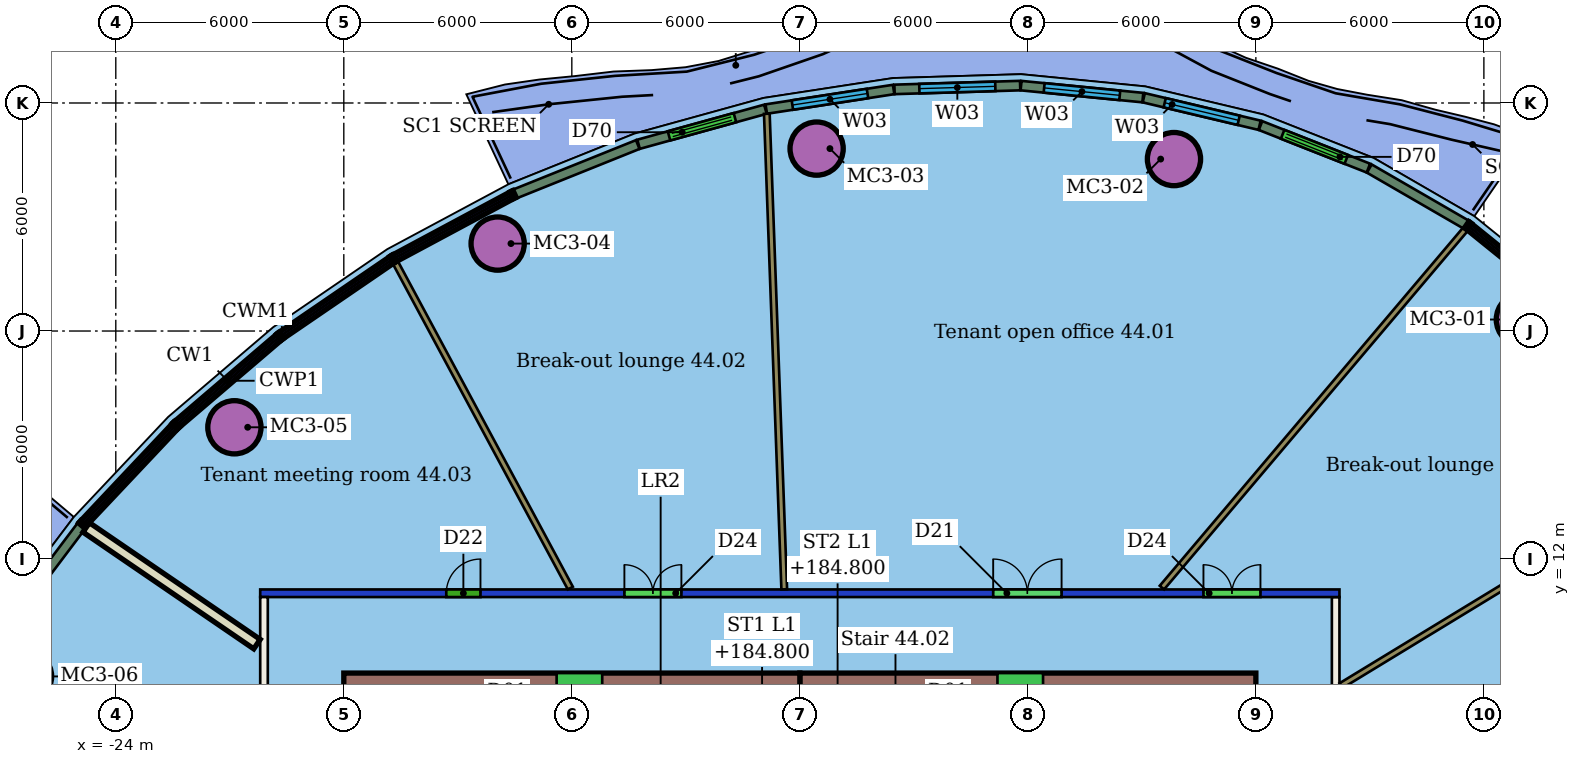
"""IFC4 building model, lengths in metres.
Left out: names, types, materials, properties, quantities, classifications, styles, units other than length and angle.
Written with IfcOpenShell. Run it as: python <this file> out.ifc"""

import sys

from ifc_helpers import new_model, si_unit, direction, frame, frame_2d, origin, origin_2d, place, context, subcontext, project, spatial, rectangle, hollow_circle, extrude, element, fill, save


model = new_model("IFC4")
c1 = context("Model", 3, precision=1e-05, world=origin(), true_north=direction((0.0, 1.0)))
c2 = subcontext(c1, "Body", "Model", "MODEL_VIEW")
j1 = project(units=[si_unit("LENGTHUNIT", "METRE"), si_unit("PLANEANGLEUNIT", "RADIAN")], contexts=[c1])
p1 = place(None, origin())
s1 = spatial("IfcSite", under=j1, at=p1, CompositionType="ELEMENT")
p2 = place(p1, origin())
s2 = spatial("IfcBuilding", under=s1, at=p2, CompositionType="ELEMENT")
p3 = place(p2, frame((0.0, 0.0, 183.0)))
s3 = spatial("IfcBuildingStorey", under=s2, at=p3, CompositionType="ELEMENT", Elevation=183.0)
for number, where, z_axis, x_axis in (
    (1, (13.026, 18.303, 0.0), (0.0, 0.0, 1.0), (1.0, 0.0, 0.0)),
    (2, (3.845, 22.524, 0.0), (0.0, 0.0, 1.0), (1.0, 0.0, 0.0)),
    (3, (-5.558, 22.8, 0.0), (0.0, 0.0, 1.0), (1.0, 0.0, 0.0)),
    (4, (-13.952, 20.301, 0.0), (0.0, 0.0, 1.0), (1.0, 0.0, 0.0)),
    (5, (-20.879, 15.467, 0.0), (0.0, 0.0, 1.0), (1.0, 0.0, 0.0)),
):
    element("IfcColumn", number, at=place(p3, frame(where, z_axis=z_axis, x_axis=x_axis)), inside=s3, PredefinedType="COLUMN", context=c2, shape_type="SweptSolid", body=[
        extrude(hollow_circle(Radius=0.7, WallThickness=0.05, at=origin_2d()), origin(), (0.0, 0.0, 1.0), 3.45),
    ])
p4 = place(p3, frame((-20.1, -11.0, 0.0), z_axis=(0.0, 0.0, 1.0), x_axis=(0.0, 1.0, 0.0)))
e6 = element("IfcWall", 6, at=p4, inside=s3, PredefinedType="PARTITIONING", context=c2, shape_type="SweptSolid", body=[
    extrude(rectangle(XDim=22.0, YDim=0.2, at=frame_2d((11.0, 0.0))), origin(), (0.0, 0.0, 1.0), 3.45),
])
p5 = place(p4, frame((15.37, 0.0, 0.0)))
e7 = element("IfcOpeningElement", 7, at=p5, cuts=e6, PredefinedType="OPENING", context=c2, shape_type="SweptSolid", body=[
    extrude(rectangle(XDim=1.2, YDim=2.1, at=frame_2d((0.6, 1.05))), frame((0.0, 0.11, 0.0), z_axis=(0.0, -1.0, 0.0), x_axis=(1.0, 0.0, 0.0)), (0.0, 0.0, 1.0), 0.22),
])
p6 = place(p4, frame((9.37, 0.0, 0.0)))
e8 = element("IfcOpeningElement", 8, at=p6, cuts=e6, PredefinedType="OPENING", context=c2, shape_type="SweptSolid", body=[
    extrude(rectangle(XDim=1.2, YDim=2.1, at=frame_2d((0.6, 1.05))), frame((0.0, 0.11, 0.0), z_axis=(0.0, -1.0, 0.0), x_axis=(1.0, 0.0, 0.0)), (0.0, 0.0, 1.0), 0.22),
])
p7 = place(p4, frame((5.797, 0.0, 0.0)))
e9 = element("IfcOpeningElement", 9, at=p7, cuts=e6, PredefinedType="OPENING", context=c2, shape_type="SweptSolid", body=[
    extrude(rectangle(XDim=1.2, YDim=2.1, at=frame_2d((0.6, 1.05))), frame((0.0, 0.11, 0.0), z_axis=(0.0, -1.0, 0.0), x_axis=(1.0, 0.0, 0.0)), (0.0, 0.0, 1.0), 0.22),
])
p8 = place(p3, frame((-20.2, 11.1, 0.0), z_axis=(0.0, 0.0, 1.0), x_axis=(1.0, 0.0, 0.0)))
e10 = element("IfcWall", 10, at=p8, inside=s3, PredefinedType="PARTITIONING", context=c2, shape_type="SweptSolid", body=[
    extrude(rectangle(XDim=28.4, YDim=0.2, at=frame_2d((14.2, 0.0))), origin(), (0.0, 0.0, 1.0), 3.05),
])
p9 = place(p8, frame((19.288, 0.0, 0.0)))
e11 = element("IfcOpeningElement", 11, at=p9, cuts=e10, PredefinedType="OPENING", context=c2, shape_type="SweptSolid", body=[
    extrude(rectangle(XDim=1.8, YDim=2.1, at=frame_2d((0.9, 1.05))), frame((0.0, 0.11, 0.0), z_axis=(0.0, -1.0, 0.0), x_axis=(1.0, 0.0, 0.0)), (0.0, 0.0, 1.0), 0.22),
])
p10 = place(p8, frame((9.583, 0.0, 0.0)))
e12 = element("IfcOpeningElement", 12, at=p10, cuts=e10, PredefinedType="OPENING", context=c2, shape_type="SweptSolid", body=[
    extrude(rectangle(XDim=1.5, YDim=2.1, at=frame_2d((0.75, 1.05))), frame((0.0, 0.11, 0.0), z_axis=(0.0, -1.0, 0.0), x_axis=(1.0, 0.0, 0.0)), (0.0, 0.0, 1.0), 0.22),
])
p11 = place(p8, frame((4.896, 0.0, 0.0)))
e13 = element("IfcOpeningElement", 13, at=p11, cuts=e10, PredefinedType="OPENING", context=c2, shape_type="SweptSolid", body=[
    extrude(rectangle(XDim=0.9, YDim=2.1, at=frame_2d((0.45, 1.05))), frame((0.0, 0.11, 0.0), z_axis=(0.0, -1.0, 0.0), x_axis=(1.0, 0.0, 0.0)), (0.0, 0.0, 1.0), 0.22),
])
p12 = place(p8, frame((24.821, 0.0, 0.0)))
e14 = element("IfcOpeningElement", 14, at=p12, cuts=e10, PredefinedType="OPENING", context=c2, shape_type="SweptSolid", body=[
    extrude(rectangle(XDim=1.5, YDim=2.1, at=frame_2d((0.75, 1.05))), frame((0.0, 0.11, 0.0), z_axis=(0.0, -1.0, 0.0), x_axis=(1.0, 0.0, 0.0)), (0.0, 0.0, 1.0), 0.22),
])
p13 = place(p3, frame((8.1, 11.0, 0.0), z_axis=(0.0, 0.0, 1.0), x_axis=(0.0, -1.0, 0.0)))
e15 = element("IfcWall", 15, at=p13, inside=s3, PredefinedType="PARTITIONING", context=c2, shape_type="SweptSolid", body=[
    extrude(rectangle(XDim=22.0, YDim=0.2, at=frame_2d((11.0, 0.0))), origin(), (0.0, 0.0, 1.0), 3.45),
])
p14 = place(p13, frame((11.367, 0.0, 0.0)))
e16 = element("IfcOpeningElement", 16, at=p14, cuts=e15, PredefinedType="OPENING", context=c2, shape_type="SweptSolid", body=[
    extrude(rectangle(XDim=1.8, YDim=2.1, at=frame_2d((0.9, 1.05))), frame((0.0, 0.11, 0.0), z_axis=(0.0, -1.0, 0.0), x_axis=(1.0, 0.0, 0.0)), (0.0, 0.0, 1.0), 0.22),
])
p15 = place(p13, frame((5.373, 0.0, 0.0)))
e17 = element("IfcOpeningElement", 17, at=p15, cuts=e15, PredefinedType="OPENING", context=c2, shape_type="SweptSolid", body=[
    extrude(rectangle(XDim=1.0, YDim=2.1, at=frame_2d((0.5, 1.05))), frame((0.0, 0.11, 0.0), z_axis=(0.0, -1.0, 0.0), x_axis=(1.0, 0.0, 0.0)), (0.0, 0.0, 1.0), 0.22),
])
p16 = place(p3, frame((11.509, 20.671, 0.0), z_axis=(0.0, 0.0, 1.0), x_axis=(-0.646338339336, -0.763050949219, 0.0)))
e18 = element("IfcWall", 18, at=p16, inside=s3, PredefinedType="PARTITIONING", context=c2, shape_type="SweptSolid", body=[
    extrude(rectangle(XDim=12.348, YDim=0.15, at=frame_2d((6.174, 0.0))), origin(), (0.0, 0.0, 1.0), 3.45),
])
p17 = place(p3, frame((-6.869, 23.716, 0.0), z_axis=(0.0, 0.0, 1.0), x_axis=(0.036615044028, -0.999329444453, 0.0)))
e19 = element("IfcWall", 19, at=p17, inside=s3, PredefinedType="PARTITIONING", context=c2, shape_type="SweptSolid", body=[
    extrude(rectangle(XDim=12.522, YDim=0.15, at=frame_2d((6.261, 0.0))), origin(), (0.0, 0.0, 1.0), 3.45),
])
p18 = place(p3, frame((-16.636, 19.79, 0.0), z_axis=(0.0, 0.0, 1.0), x_axis=(0.473414588536, -0.880839728532, 0.0)))
e20 = element("IfcWall", 20, at=p18, inside=s3, PredefinedType="PARTITIONING", context=c2, shape_type="SweptSolid", body=[
    extrude(rectangle(XDim=9.712, YDim=0.15, at=frame_2d((4.856, 0.0))), origin(), (0.0, 0.0, 1.0), 3.45),
])
p19 = place(p3, frame((-24.779, 12.832, 0.0), z_axis=(0.0, 0.0, 1.0), x_axis=(0.825654739336, -0.564175727422, 0.0)))
e21 = element("IfcWall", 21, at=p19, inside=s3, PredefinedType="PARTITIONING", context=c2, shape_type="SweptSolid", body=[
    extrude(rectangle(XDim=5.443, YDim=0.3, at=frame_2d((2.722, 0.0))), origin(), (0.0, 0.0, 1.0), 3.45),
])
p20 = place(p3, frame((17.335, 14.204, 0.0), z_axis=(0.0, 0.0, 1.0), x_axis=(-0.854194128167, -0.51995422049, 0.0)))
e22 = element("IfcWall", 22, at=p20, inside=s3, PredefinedType="PARTITIONING", context=c2, shape_type="SweptSolid", body=[
    extrude(rectangle(XDim=10.648, YDim=0.15, at=frame_2d((5.324, 0.0))), origin(), (0.0, 0.0, 1.0), 3.45),
])
p21 = place(p3, frame((11.532, 20.801, 0.0), z_axis=(0.0, 0.0, 1.0), x_axis=(-0.865519049877, 0.500876006912, 0.0)))
e23 = element("IfcWall", 23, at=p21, inside=s3, PredefinedType="SOLIDWALL", context=c2, shape_type="SweptSolid", body=[
    extrude(rectangle(XDim=2.943, YDim=0.25, at=frame_2d((1.471, 0.0))), origin(), (0.0, 0.0, 1.0), 3.1),
])
p22 = place(p3, frame((8.961, 22.287, 0.0), z_axis=(0.0, 0.0, 1.0), x_axis=(-0.930291773294, 0.366820414564, 0.0)))
e24 = element("IfcWall", 24, at=p22, inside=s3, PredefinedType="SOLIDWALL", context=c2, shape_type="SweptSolid", body=[
    extrude(rectangle(XDim=3.052, YDim=0.25, at=frame_2d((1.526, 0.0))), origin(), (0.0, 0.0, 1.0), 3.1),
])
p23 = place(p22, frame((0.626, 0.0, 0.0)))
e25 = element("IfcOpeningElement", 25, at=p23, cuts=e24, PredefinedType="OPENING", context=c2, shape_type="SweptSolid", body=[
    extrude(rectangle(XDim=1.8, YDim=2.4, at=frame_2d((0.9, 1.2))), frame((0.0, 0.135, 0.0), z_axis=(0.0, -1.0, 0.0), x_axis=(1.0, 0.0, 0.0)), (0.0, 0.0, 1.0), 0.27),
])
p24 = place(p3, frame((6.098, 23.414, 0.0), z_axis=(0.0, 0.0, 1.0), x_axis=(-0.972913986276, 0.231167418353, 0.0)))
e26 = element("IfcWall", 26, at=p24, inside=s3, PredefinedType="SOLIDWALL", context=c2, shape_type="SweptSolid", body=[
    extrude(rectangle(XDim=3.133, YDim=0.25, at=frame_2d((1.566, 0.0))), origin(), (0.0, 0.0, 1.0), 3.1),
])
p25 = place(p24, frame((0.566, 0.0, 0.9)))
e27 = element("IfcOpeningElement", 27, at=p25, cuts=e26, PredefinedType="OPENING", context=c2, shape_type="SweptSolid", body=[
    extrude(rectangle(XDim=2.0, YDim=2.1, at=frame_2d((1.0, 1.05))), frame((0.0, 0.135, 0.0), z_axis=(0.0, -1.0, 0.0), x_axis=(1.0, 0.0, 0.0)), (0.0, 0.0, 1.0), 0.27),
])
p26 = place(p3, frame((3.026, 24.142, 0.0), z_axis=(0.0, 0.0, 1.0), x_axis=(-0.995197289781, 0.097889501037, 0.0)))
e28 = element("IfcWall", 28, at=p26, inside=s3, PredefinedType="SOLIDWALL", context=c2, shape_type="SweptSolid", body=[
    extrude(rectangle(XDim=3.22, YDim=0.25, at=frame_2d((1.61, 0.0))), origin(), (0.0, 0.0, 1.0), 3.1),
])
p27 = place(p26, frame((0.61, 0.0, 0.9)))
e29 = element("IfcOpeningElement", 29, at=p27, cuts=e28, PredefinedType="OPENING", context=c2, shape_type="SweptSolid", body=[
    extrude(rectangle(XDim=2.0, YDim=2.1, at=frame_2d((1.0, 1.05))), frame((0.0, 0.135, 0.0), z_axis=(0.0, -1.0, 0.0), x_axis=(1.0, 0.0, 0.0)), (0.0, 0.0, 1.0), 0.27),
])
p28 = place(p3, frame((-0.203, 24.458, 0.0), z_axis=(0.0, 0.0, 1.0), x_axis=(-0.999539823928, -0.030333815819, 0.0)))
e30 = element("IfcWall", 30, at=p28, inside=s3, PredefinedType="SOLIDWALL", context=c2, shape_type="SweptSolid", body=[
    extrude(rectangle(XDim=3.308, YDim=0.25, at=frame_2d((1.654, 0.0))), origin(), (0.0, 0.0, 1.0), 3.1),
])
p29 = place(p28, frame((0.654, 0.0, 0.9)))
e31 = element("IfcOpeningElement", 31, at=p29, cuts=e30, PredefinedType="OPENING", context=c2, shape_type="SweptSolid", body=[
    extrude(rectangle(XDim=2.0, YDim=2.1, at=frame_2d((1.0, 1.05))), frame((0.0, 0.135, 0.0), z_axis=(0.0, -1.0, 0.0), x_axis=(1.0, 0.0, 0.0)), (0.0, 0.0, 1.0), 0.27),
])
p30 = place(p3, frame((-3.532, 24.355, 0.0), z_axis=(0.0, 0.0, 1.0), x_axis=(-0.988391666962, -0.151927326968, 0.0)))
e32 = element("IfcWall", 32, at=p30, inside=s3, PredefinedType="SOLIDWALL", context=c2, shape_type="SweptSolid", body=[
    extrude(rectangle(XDim=3.391, YDim=0.25, at=frame_2d((1.695, 0.0))), origin(), (0.0, 0.0, 1.0), 3.1),
])
p31 = place(p30, frame((0.695, 0.0, 0.9)))
e33 = element("IfcOpeningElement", 33, at=p31, cuts=e32, PredefinedType="OPENING", context=c2, shape_type="SweptSolid", body=[
    extrude(rectangle(XDim=2.0, YDim=2.1, at=frame_2d((1.0, 1.05))), frame((0.0, 0.135, 0.0), z_axis=(0.0, -1.0, 0.0), x_axis=(1.0, 0.0, 0.0)), (0.0, 0.0, 1.0), 0.27),
])
p32 = place(p3, frame((-6.906, 23.836, 0.0), z_axis=(0.0, 0.0, 1.0), x_axis=(-0.963922792933, -0.266181985236, 0.0)))
e34 = element("IfcWall", 34, at=p32, inside=s3, PredefinedType="SOLIDWALL", context=c2, shape_type="SweptSolid", body=[
    extrude(rectangle(XDim=3.463, YDim=0.25, at=frame_2d((1.732, 0.0))), origin(), (0.0, 0.0, 1.0), 3.1),
])
p33 = place(p32, frame((0.832, 0.0, 0.0)))
e35 = element("IfcOpeningElement", 35, at=p33, cuts=e34, PredefinedType="OPENING", context=c2, shape_type="SweptSolid", body=[
    extrude(rectangle(XDim=1.8, YDim=2.4, at=frame_2d((0.9, 1.2))), frame((0.0, 0.135, 0.0), z_axis=(0.0, -1.0, 0.0), x_axis=(1.0, 0.0, 0.0)), (0.0, 0.0, 1.0), 0.27),
])
p34 = place(p3, frame((-10.265, 22.907, 0.0), z_axis=(0.0, 0.0, 1.0), x_axis=(-0.92785563981, -0.372939554984, 0.0)))
e36 = element("IfcWall", 36, at=p34, inside=s3, PredefinedType="SOLIDWALL", context=c2, shape_type="SweptSolid", body=[
    extrude(rectangle(XDim=3.478, YDim=0.25, at=frame_2d((1.739, 0.0))), origin(), (0.0, 0.0, 1.0), 3.1),
])
p35 = place(p3, frame((-24.908, 12.869, 0.0), z_axis=(0.0, 0.0, 1.0), x_axis=(-0.602031278038, -0.798472504388, 0.0)))
e37 = element("IfcWall", 37, at=p35, inside=s3, PredefinedType="SOLIDWALL", context=c2, shape_type="SweptSolid", body=[
    extrude(rectangle(XDim=3.477, YDim=0.25, at=frame_2d((1.739, 0.0))), origin(), (0.0, 0.0, 1.0), 3.1),
])
p36 = place(p3, frame((6.0, 8.5, 0.0), z_axis=(0.0, 0.0, 1.0), x_axis=(-1.0, 0.0, 0.0)))
e38 = element("IfcWall", 38, at=p36, inside=s3, PredefinedType="SHEAR", context=c2, shape_type="SweptSolid", body=[
    extrude(rectangle(XDim=12.0, YDim=1.0, at=frame_2d((6.0, 0.0))), origin(), (0.0, 0.0, 1.0), 3.3),
])
p37 = place(p36, frame((5.6, 0.0, 0.0)))
e39 = element("IfcOpeningElement", 39, at=p37, cuts=e38, PredefinedType="OPENING", context=c2, shape_type="SweptSolid", body=[
    extrude(rectangle(XDim=1.2, YDim=2.1, at=frame_2d((0.6, 1.05))), frame((0.0, 0.51, 0.0), z_axis=(0.0, -1.0, 0.0), x_axis=(1.0, 0.0, 0.0)), (0.0, 0.0, 1.0), 1.02),
])
p38 = place(p3, frame((-6.0, 8.5, 0.0), z_axis=(0.0, 0.0, 1.0), x_axis=(-1.0, 0.0, 0.0)))
e40 = element("IfcWall", 40, at=p38, inside=s3, PredefinedType="SHEAR", context=c2, shape_type="SweptSolid", body=[
    extrude(rectangle(XDim=12.0, YDim=1.0, at=frame_2d((6.0, 0.0))), origin(), (0.0, 0.0, 1.0), 3.3),
])
p39 = place(p38, frame((5.2, 0.0, 0.0)))
e41 = element("IfcOpeningElement", 41, at=p39, cuts=e40, PredefinedType="OPENING", context=c2, shape_type="SweptSolid", body=[
    extrude(rectangle(XDim=1.2, YDim=2.1, at=frame_2d((0.6, 1.05))), frame((0.0, 0.51, 0.0), z_axis=(0.0, -1.0, 0.0), x_axis=(1.0, 0.0, 0.0)), (0.0, 0.0, 1.0), 1.02),
])
p40 = place(p9, origin())
e42 = element("IfcDoor", 42, at=p40, inside=s3, OperationType="DOUBLE_DOOR_SINGLE_SWING", PredefinedType="DOOR", context=c2, shape_type="SweptSolid", body=[
    extrude(rectangle(XDim=1.8, YDim=2.1, at=frame_2d((0.9, 1.05))), frame((0.0, 0.025, 0.0), z_axis=(0.0, -1.0, 0.0), x_axis=(1.0, 0.0, 0.0)), (0.0, 0.0, 1.0), 0.05),
])
fill(e11, e42)
p41 = place(p10, origin())
e43 = element("IfcDoor", 43, at=p41, inside=s3, OperationType="DOUBLE_DOOR_SINGLE_SWING", PredefinedType="DOOR", context=c2, shape_type="SweptSolid", body=[
    extrude(rectangle(XDim=1.5, YDim=2.1, at=frame_2d((0.75, 1.05))), frame((0.0, 0.025, 0.0), z_axis=(0.0, -1.0, 0.0), x_axis=(1.0, 0.0, 0.0)), (0.0, 0.0, 1.0), 0.05),
])
fill(e12, e43)
p42 = place(p11, origin())
e44 = element("IfcDoor", 44, at=p42, inside=s3, OperationType="SINGLE_SWING_RIGHT", PredefinedType="DOOR", context=c2, shape_type="SweptSolid", body=[
    extrude(rectangle(XDim=0.9, YDim=2.1, at=frame_2d((0.45, 1.05))), frame((0.0, 0.025, 0.0), z_axis=(0.0, -1.0, 0.0), x_axis=(1.0, 0.0, 0.0)), (0.0, 0.0, 1.0), 0.05),
])
fill(e13, e44)
p43 = place(p12, origin())
e45 = element("IfcDoor", 45, at=p43, inside=s3, OperationType="DOUBLE_DOOR_SINGLE_SWING", PredefinedType="DOOR", context=c2, shape_type="SweptSolid", body=[
    extrude(rectangle(XDim=1.5, YDim=2.1, at=frame_2d((0.75, 1.05))), frame((0.0, 0.025, 0.0), z_axis=(0.0, -1.0, 0.0), x_axis=(1.0, 0.0, 0.0)), (0.0, 0.0, 1.0), 0.05),
])
fill(e14, e45)
p44 = place(p23, origin())
e46 = element("IfcDoor", 46, at=p44, inside=s3, OperationType="DOUBLE_DOOR_SLIDING", PredefinedType="DOOR", context=c2, shape_type="SweptSolid", body=[
    extrude(rectangle(XDim=1.8, YDim=2.4, at=frame_2d((0.9, 1.2))), frame((0.0, 0.025, 0.0), z_axis=(0.0, -1.0, 0.0), x_axis=(1.0, 0.0, 0.0)), (0.0, 0.0, 1.0), 0.05),
])
fill(e25, e46)
p45 = place(p25, origin())
e47 = element("IfcWindow", 47, at=p45, inside=s3, PartitioningType="SINGLE_PANEL", PredefinedType="WINDOW", context=c2, shape_type="SweptSolid", body=[
    extrude(rectangle(XDim=2.0, YDim=2.1, at=frame_2d((1.0, 1.05))), frame((0.0, 0.03, 0.0), z_axis=(0.0, -1.0, 0.0), x_axis=(1.0, 0.0, 0.0)), (0.0, 0.0, 1.0), 0.06),
])
fill(e27, e47)
p46 = place(p27, origin())
e48 = element("IfcWindow", 48, at=p46, inside=s3, PartitioningType="SINGLE_PANEL", PredefinedType="WINDOW", context=c2, shape_type="SweptSolid", body=[
    extrude(rectangle(XDim=2.0, YDim=2.1, at=frame_2d((1.0, 1.05))), frame((0.0, 0.03, 0.0), z_axis=(0.0, -1.0, 0.0), x_axis=(1.0, 0.0, 0.0)), (0.0, 0.0, 1.0), 0.06),
])
fill(e29, e48)
p47 = place(p29, origin())
e49 = element("IfcWindow", 49, at=p47, inside=s3, PartitioningType="SINGLE_PANEL", PredefinedType="WINDOW", context=c2, shape_type="SweptSolid", body=[
    extrude(rectangle(XDim=2.0, YDim=2.1, at=frame_2d((1.0, 1.05))), frame((0.0, 0.03, 0.0), z_axis=(0.0, -1.0, 0.0), x_axis=(1.0, 0.0, 0.0)), (0.0, 0.0, 1.0), 0.06),
])
fill(e31, e49)
p48 = place(p31, origin())
e50 = element("IfcWindow", 50, at=p48, inside=s3, PartitioningType="SINGLE_PANEL", PredefinedType="WINDOW", context=c2, shape_type="SweptSolid", body=[
    extrude(rectangle(XDim=2.0, YDim=2.1, at=frame_2d((1.0, 1.05))), frame((0.0, 0.03, 0.0), z_axis=(0.0, -1.0, 0.0), x_axis=(1.0, 0.0, 0.0)), (0.0, 0.0, 1.0), 0.06),
])
fill(e33, e50)
p49 = place(p33, origin())
e51 = element("IfcDoor", 51, at=p49, inside=s3, OperationType="DOUBLE_DOOR_SLIDING", PredefinedType="DOOR", context=c2, shape_type="SweptSolid", body=[
    extrude(rectangle(XDim=1.8, YDim=2.4, at=frame_2d((0.9, 1.2))), frame((0.0, 0.025, 0.0), z_axis=(0.0, -1.0, 0.0), x_axis=(1.0, 0.0, 0.0)), (0.0, 0.0, 1.0), 0.05),
])
fill(e35, e51)
save(model, sys.argv[1])
